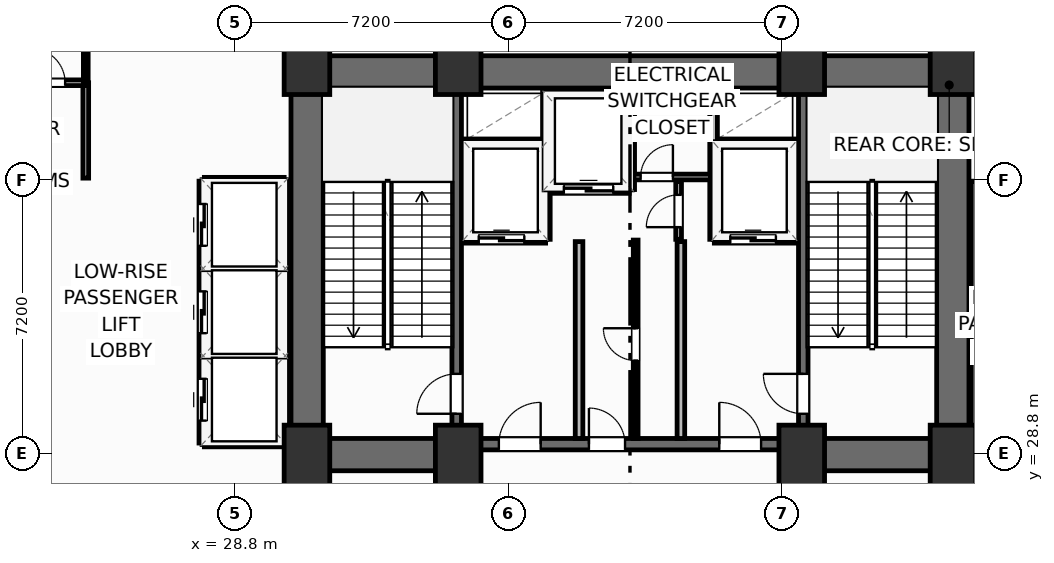
"""IFC4 building model, lengths in metres.
Left out: names, types, materials, properties, quantities, classifications, styles, units other than length and angle.
Written with IfcOpenShell. Run it as: python <this file> out.ifc"""

import sys

from ifc_helpers import new_model, si_unit, direction, frame, frame_2d, origin, origin_2d, place, context, subcontext, project, spatial, rectangle, extrude, element, fill, save


model = new_model("IFC4")
c1 = context("Model", 3, precision=1e-05, world=origin(), true_north=direction((0.0, 1.0)))
c2 = subcontext(c1, "Body", "Model", "MODEL_VIEW")
j1 = project(units=[si_unit("LENGTHUNIT", "METRE"), si_unit("PLANEANGLEUNIT", "RADIAN")], contexts=[c1])
p1 = place(None, origin())
s1 = spatial("IfcSite", under=j1, at=p1, CompositionType="ELEMENT")
p2 = place(p1, origin())
s2 = spatial("IfcBuilding", under=s1, at=p2, CompositionType="ELEMENT")
p3 = place(p2, frame((0.0, 0.0, 5.4)))
s3 = spatial("IfcBuildingStorey", under=s2, at=p3, CompositionType="ELEMENT", Elevation=5.4)
for number, where, z_axis, x_axis in (
    (1, (30.7, 28.75, 0.0), (0.0, 0.0, 1.0), (1.0, 0.0, 0.0)),
    (2, (34.68, 28.75, 0.0), (0.0, 0.0, 1.0), (1.0, 0.0, 0.0)),
    (3, (43.72, 28.75, 0.0), (0.0, 0.0, 1.0), (1.0, 0.0, 0.0)),
    (4, (47.7, 28.75, 0.0), (0.0, 0.0, 1.0), (1.0, 0.0, 0.0)),
    (5, (30.7, 39.05, 0.0), (0.0, 0.0, 1.0), (1.0, 0.0, 0.0)),
    (6, (34.68, 39.05, 0.0), (0.0, 0.0, 1.0), (1.0, 0.0, 0.0)),
    (7, (43.72, 39.05, 0.0), (0.0, 0.0, 1.0), (1.0, 0.0, 0.0)),
    (8, (47.7, 39.05, 0.0), (0.0, 0.0, 1.0), (1.0, 0.0, 0.0)),
):
    element("IfcColumn", number, at=place(p3, frame(where, z_axis=z_axis, x_axis=x_axis)), inside=s3, PredefinedType="COLUMN", context=c2, shape_type="SweptSolid", body=[
        extrude(rectangle(XDim=1.2, YDim=1.6, at=origin_2d()), origin(), (0.0, 0.0, 1.0), 5.4),
    ])
p4 = place(p3, frame((30.28, 38.845, 0.0), z_axis=(0.0, 0.0, 1.0), x_axis=(1.0, 0.0, 0.0)))
e9 = element("IfcWall", 9, at=p4, inside=s3, PredefinedType="SHEAR", context=c2, shape_type="SweptSolid", body=[
    extrude(rectangle(XDim=17.84, YDim=0.85, at=frame_2d((8.92, 0.0))), origin(), (0.0, 0.0, 1.0), 5.12),
])
for number, where, z_axis, x_axis in (
    (10, (30.705, 29.2, 0.0), (0.0, 0.0, 1.0), (0.0, 1.0, 0.0)),
    (11, (47.695, 29.2, 0.0), (0.0, 0.0, 1.0), (0.0, 1.0, 0.0)),
):
    element("IfcWall", number, at=place(p3, frame(where, z_axis=z_axis, x_axis=x_axis)), inside=s3, PredefinedType="SHEAR", context=c2, shape_type="SweptSolid", body=[
        extrude(rectangle(XDim=9.22, YDim=0.85, at=frame_2d((4.61, 0.0))), origin(), (0.0, 0.0, 1.0), 5.12),
    ])
for number, where, z_axis, x_axis in (
    (12, (30.28, 28.775, 0.0), (0.0, 0.0, 1.0), (1.0, 0.0, 0.0)),
    (13, (43.6, 28.775, 0.0), (0.0, 0.0, 1.0), (1.0, 0.0, 0.0)),
):
    element("IfcWall", number, at=place(p3, frame(where, z_axis=z_axis, x_axis=x_axis)), inside=s3, PredefinedType="SHEAR", context=c2, shape_type="SweptSolid", body=[
        extrude(rectangle(XDim=4.52, YDim=0.85, at=frame_2d((2.26, 0.0))), origin(), (0.0, 0.0, 1.0), 5.12),
    ])
p5 = place(p3, frame((34.8, 29.05, 0.0), z_axis=(0.0, 0.0, 1.0), x_axis=(1.0, 0.0, 0.0)))
e14 = element("IfcWall", 14, at=p5, inside=s3, PredefinedType="SHEAR", context=c2, shape_type="SweptSolid", body=[
    extrude(rectangle(XDim=8.8, YDim=0.3, at=frame_2d((4.4, 0.0))), origin(), (0.0, 0.0, 1.0), 5.12),
])
p6 = place(p5, frame((0.95, 0.0, 0.0)))
e15 = element("IfcOpeningElement", 15, at=p6, cuts=e14, PredefinedType="OPENING", context=c2, shape_type="SweptSolid", body=[
    extrude(rectangle(XDim=1.1, YDim=2.15, at=frame_2d((0.55, 1.075))), frame((0.0, 0.16, 0.0), z_axis=(0.0, -1.0, 0.0), x_axis=(1.0, 0.0, 0.0)), (0.0, 0.0, 1.0), 0.32),
])
p7 = place(p5, frame((6.75, 0.0, 0.0)))
e16 = element("IfcOpeningElement", 16, at=p7, cuts=e14, PredefinedType="OPENING", context=c2, shape_type="SweptSolid", body=[
    extrude(rectangle(XDim=1.1, YDim=2.15, at=frame_2d((0.55, 1.075))), frame((0.0, 0.16, 0.0), z_axis=(0.0, -1.0, 0.0), x_axis=(1.0, 0.0, 0.0)), (0.0, 0.0, 1.0), 0.32),
])
p8 = place(p5, frame((3.32, 0.0, 0.0)))
e17 = element("IfcOpeningElement", 17, at=p8, cuts=e14, PredefinedType="OPENING", context=c2, shape_type="SweptSolid", body=[
    extrude(rectangle(XDim=0.95, YDim=2.15, at=frame_2d((0.475, 1.075))), frame((0.0, 0.16, 0.0), z_axis=(0.0, -1.0, 0.0), x_axis=(1.0, 0.0, 0.0)), (0.0, 0.0, 1.0), 0.32),
])
p9 = place(p3, frame((34.64, 29.2, 0.0), z_axis=(0.0, 0.0, 1.0), x_axis=(0.0, 1.0, 0.0)))
e18 = element("IfcWall", 18, at=p9, inside=s3, PredefinedType="SHEAR", context=c2, shape_type="SweptSolid", body=[
    extrude(rectangle(XDim=9.22, YDim=0.25, at=frame_2d((4.61, 0.0))), origin(), (0.0, 0.0, 1.0), 5.12),
])
p10 = place(p9, frame((0.65, 0.0, 0.0)))
e19 = element("IfcOpeningElement", 19, at=p10, cuts=e18, PredefinedType="OPENING", context=c2, shape_type="SweptSolid", body=[
    extrude(rectangle(XDim=1.05, YDim=2.15, at=frame_2d((0.525, 1.075))), frame((0.0, 0.135, 0.0), z_axis=(0.0, -1.0, 0.0), x_axis=(1.0, 0.0, 0.0)), (0.0, 0.0, 1.0), 0.27),
])
p11 = place(p3, frame((43.76, 29.2, 0.0), z_axis=(0.0, 0.0, 1.0), x_axis=(0.0, 1.0, 0.0)))
e20 = element("IfcWall", 20, at=p11, inside=s3, PredefinedType="SHEAR", context=c2, shape_type="SweptSolid", body=[
    extrude(rectangle(XDim=9.22, YDim=0.25, at=frame_2d((4.61, 0.0))), origin(), (0.0, 0.0, 1.0), 5.12),
])
p12 = place(p11, frame((0.65, 0.0, 0.0)))
e21 = element("IfcOpeningElement", 21, at=p12, cuts=e20, PredefinedType="OPENING", context=c2, shape_type="SweptSolid", body=[
    extrude(rectangle(XDim=1.05, YDim=2.15, at=frame_2d((0.525, 1.075))), frame((0.0, 0.135, 0.0), z_axis=(0.0, -1.0, 0.0), x_axis=(1.0, 0.0, 0.0)), (0.0, 0.0, 1.0), 0.27),
])
p13 = place(p3, frame((24.88, 36.05, 0.0), z_axis=(0.0, 0.0, 1.0), x_axis=(0.0, 1.0, 0.0)))
e22 = element("IfcWall", 22, at=p13, inside=s3, PredefinedType="PARTITIONING", context=c2, shape_type="SweptSolid", body=[
    extrude(rectangle(XDim=2.51, YDim=0.15, at=frame_2d((1.255, 0.0))), origin(), (0.0, 0.0, 1.0), 5.12),
])
p14 = place(p3, frame((18.6, 38.56, 0.0), z_axis=(0.0, 0.0, 1.0), x_axis=(1.0, 0.0, 0.0)))
e23 = element("IfcWall", 23, at=p14, inside=s3, PredefinedType="PARTITIONING", context=c2, shape_type="SweptSolid", body=[
    extrude(rectangle(XDim=6.28, YDim=0.15, at=frame_2d((3.14, 0.0))), origin(), (0.0, 0.0, 1.0), 5.12),
])
p15 = place(p14, frame((0.614, 0.0, 0.0)))
e24 = element("IfcOpeningElement", 24, at=p15, cuts=e23, PredefinedType="OPENING", context=c2, shape_type="SweptSolid", body=[
    extrude(rectangle(XDim=0.9, YDim=2.05, at=frame_2d((0.45, 1.025))), frame((0.0, 0.085, 0.0), z_axis=(0.0, -1.0, 0.0), x_axis=(1.0, 0.0, 0.0)), (0.0, 0.0, 1.0), 0.17),
])
p16 = place(p14, frame((2.75, 0.0, 0.0)))
e25 = element("IfcOpeningElement", 25, at=p16, cuts=e23, PredefinedType="OPENING", context=c2, shape_type="SweptSolid", body=[
    extrude(rectangle(XDim=0.9, YDim=2.05, at=frame_2d((0.45, 1.025))), frame((0.0, 0.085, 0.0), z_axis=(0.0, -1.0, 0.0), x_axis=(1.0, 0.0, 0.0)), (0.0, 0.0, 1.0), 0.17),
])
p17 = place(p14, frame((4.836, 0.0, 0.0)))
e26 = element("IfcOpeningElement", 26, at=p17, cuts=e23, PredefinedType="OPENING", context=c2, shape_type="SweptSolid", body=[
    extrude(rectangle(XDim=0.9, YDim=2.05, at=frame_2d((0.45, 1.025))), frame((0.0, 0.085, 0.0), z_axis=(0.0, -1.0, 0.0), x_axis=(1.0, 0.0, 0.0)), (0.0, 0.0, 1.0), 0.17),
])
p18 = place(p3, frame((24.88, 38.56, 0.0), z_axis=(0.0, 0.0, 1.0), x_axis=(0.0, 1.0, 0.0)))
e27 = element("IfcWall", 27, at=p18, inside=s3, PredefinedType="PARTITIONING", context=c2, shape_type="SweptSolid", body=[
    extrude(rectangle(XDim=4.69, YDim=0.125, at=frame_2d((2.345, 0.0))), origin(), (0.0, 0.0, 1.0), 5.12),
])
for number, where, z_axis, x_axis in (
    (28, (37.86, 29.2, 0.0), (0.0, 0.0, 1.0), (0.0, 1.0, 0.0)),
    (29, (40.54, 29.2, 0.0), (0.0, 0.0, 1.0), (0.0, 1.0, 0.0)),
):
    element("IfcWall", number, at=place(p3, frame(where, z_axis=z_axis, x_axis=x_axis)), inside=s3, PredefinedType="PARTITIONING", context=c2, shape_type="SweptSolid", body=[
        extrude(rectangle(XDim=5.18, YDim=0.2, at=frame_2d((2.59, 0.0))), origin(), (0.0, 0.0, 1.0), 5.12),
    ])
p19 = place(p3, frame((34.8, 34.44, 0.0), z_axis=(0.0, 0.0, 1.0), x_axis=(1.0, 0.0, 0.0)))
e30 = element("IfcWall", 30, at=p19, inside=s3, PredefinedType="PARTITIONING", context=c2, shape_type="SweptSolid", body=[
    extrude(rectangle(XDim=2.18, YDim=0.2, at=frame_2d((1.09, 0.0))), origin(), (0.0, 0.0, 1.0), 5.12),
])
p20 = place(p19, frame((0.42, 0.0, 0.0)))
e31 = element("IfcOpeningElement", 31, at=p20, cuts=e30, PredefinedType="OPENING", context=c2, shape_type="SweptSolid", body=[
    extrude(rectangle(XDim=1.2, YDim=2.2, at=frame_2d((0.6, 1.1))), frame((0.0, 0.11, 0.0), z_axis=(0.0, -1.0, 0.0), x_axis=(1.0, 0.0, 0.0)), (0.0, 0.0, 1.0), 0.22),
])
p21 = place(p3, frame((34.8, 36.98, 0.0), z_axis=(0.0, 0.0, 1.0), x_axis=(1.0, 0.0, 0.0)))
e32 = element("IfcWall", 32, at=p21, inside=s3, PredefinedType="PARTITIONING", context=c2, shape_type="SweptSolid", body=[
    extrude(rectangle(XDim=2.18, YDim=0.2, at=frame_2d((1.09, 0.0))), origin(), (0.0, 0.0, 1.0), 5.12),
])
p22 = place(p3, frame((37.0, 34.44, 0.0), z_axis=(0.0, 0.0, 1.0), x_axis=(0.0, 1.0, 0.0)))
e33 = element("IfcWall", 33, at=p22, inside=s3, PredefinedType="PARTITIONING", context=c2, shape_type="SweptSolid", body=[
    extrude(rectangle(XDim=3.9, YDim=0.2, at=frame_2d((1.95, 0.0))), origin(), (0.0, 0.0, 1.0), 5.12),
])
p23 = place(p3, frame((41.42, 34.44, 0.0), z_axis=(0.0, 0.0, 1.0), x_axis=(1.0, 0.0, 0.0)))
e34 = element("IfcWall", 34, at=p23, inside=s3, PredefinedType="PARTITIONING", context=c2, shape_type="SweptSolid", body=[
    extrude(rectangle(XDim=2.18, YDim=0.2, at=frame_2d((1.09, 0.0))), origin(), (0.0, 0.0, 1.0), 5.12),
])
p24 = place(p23, frame((0.42, 0.0, 0.0)))
e35 = element("IfcOpeningElement", 35, at=p24, cuts=e34, PredefinedType="OPENING", context=c2, shape_type="SweptSolid", body=[
    extrude(rectangle(XDim=1.2, YDim=2.2, at=frame_2d((0.6, 1.1))), frame((0.0, 0.11, 0.0), z_axis=(0.0, -1.0, 0.0), x_axis=(1.0, 0.0, 0.0)), (0.0, 0.0, 1.0), 0.22),
])
p25 = place(p3, frame((41.42, 36.98, 0.0), z_axis=(0.0, 0.0, 1.0), x_axis=(1.0, 0.0, 0.0)))
e36 = element("IfcWall", 36, at=p25, inside=s3, PredefinedType="PARTITIONING", context=c2, shape_type="SweptSolid", body=[
    extrude(rectangle(XDim=2.18, YDim=0.2, at=frame_2d((1.09, 0.0))), origin(), (0.0, 0.0, 1.0), 5.12),
])
p26 = place(p3, frame((41.4, 34.44, 0.0), z_axis=(0.0, 0.0, 1.0), x_axis=(0.0, 1.0, 0.0)))
e37 = element("IfcWall", 37, at=p26, inside=s3, PredefinedType="PARTITIONING", context=c2, shape_type="SweptSolid", body=[
    extrude(rectangle(XDim=3.9, YDim=0.2, at=frame_2d((1.95, 0.0))), origin(), (0.0, 0.0, 1.0), 5.12),
])
p27 = place(p3, frame((37.06, 35.75, 0.0), z_axis=(0.0, 0.0, 1.0), x_axis=(1.0, 0.0, 0.0)))
e38 = element("IfcWall", 38, at=p27, inside=s3, PredefinedType="PARTITIONING", context=c2, shape_type="SweptSolid", body=[
    extrude(rectangle(XDim=2.12, YDim=0.2, at=frame_2d((1.06, 0.0))), origin(), (0.0, 0.0, 1.0), 5.12),
])
p28 = place(p27, frame((0.4, 0.0, 0.0)))
e39 = element("IfcOpeningElement", 39, at=p28, cuts=e38, PredefinedType="OPENING", context=c2, shape_type="SweptSolid", body=[
    extrude(rectangle(XDim=1.3, YDim=2.2, at=frame_2d((0.65, 1.1))), frame((0.0, 0.11, 0.0), z_axis=(0.0, -1.0, 0.0), x_axis=(1.0, 0.0, 0.0)), (0.0, 0.0, 1.0), 0.22),
])
p29 = place(p3, frame((39.22, 35.75, 0.0), z_axis=(0.0, 0.0, 1.0), x_axis=(0.0, 1.0, 0.0)))
e40 = element("IfcWall", 40, at=p29, inside=s3, PredefinedType="PARTITIONING", context=c2, shape_type="SweptSolid", body=[
    extrude(rectangle(XDim=2.59, YDim=0.2, at=frame_2d((1.295, 0.0))), origin(), (0.0, 0.0, 1.0), 5.12),
])
p30 = place(p3, frame((39.3, 36.08, 0.0), z_axis=(0.0, 0.0, 1.0), x_axis=(1.0, 0.0, 0.0)))
e41 = element("IfcWall", 41, at=p30, inside=s3, PredefinedType="PARTITIONING", context=c2, shape_type="SweptSolid", body=[
    extrude(rectangle(XDim=2.02, YDim=0.15, at=frame_2d((1.01, 0.0))), origin(), (0.0, 0.0, 1.0), 5.12),
])
p31 = place(p30, frame((0.18, 0.0, 0.0)))
e42 = element("IfcOpeningElement", 42, at=p31, cuts=e41, PredefinedType="OPENING", context=c2, shape_type="SweptSolid", body=[
    extrude(rectangle(XDim=0.85, YDim=2.05, at=frame_2d((0.425, 1.025))), frame((0.0, 0.085, 0.0), z_axis=(0.0, -1.0, 0.0), x_axis=(1.0, 0.0, 0.0)), (0.0, 0.0, 1.0), 0.17),
])
p32 = place(p3, frame((40.48, 34.44, 0.0), z_axis=(0.0, 0.0, 1.0), x_axis=(0.0, 1.0, 0.0)))
e43 = element("IfcWall", 43, at=p32, inside=s3, PredefinedType="PARTITIONING", context=c2, shape_type="SweptSolid", body=[
    extrude(rectangle(XDim=1.52, YDim=0.15, at=frame_2d((0.76, 0.0))), origin(), (0.0, 0.0, 1.0), 5.12),
])
p33 = place(p32, frame((0.32, 0.0, 0.0)))
e44 = element("IfcOpeningElement", 44, at=p33, cuts=e43, PredefinedType="OPENING", context=c2, shape_type="SweptSolid", body=[
    extrude(rectangle(XDim=0.85, YDim=2.05, at=frame_2d((0.425, 1.025))), frame((0.0, 0.085, 0.0), z_axis=(0.0, -1.0, 0.0), x_axis=(1.0, 0.0, 0.0)), (0.0, 0.0, 1.0), 0.17),
])
p34 = place(p3, frame((39.35, 29.2, 0.0), z_axis=(0.0, 0.0, 1.0), x_axis=(0.0, 1.0, 0.0)))
e45 = element("IfcWall", 45, at=p34, inside=s3, PredefinedType="PARTITIONING", context=c2, shape_type="SweptSolid", body=[
    extrude(rectangle(XDim=5.22, YDim=0.125, at=frame_2d((2.61, 0.0))), origin(), (0.0, 0.0, 1.0), 5.12),
])
p35 = place(p34, frame((2.05, 0.0, 0.0)))
e46 = element("IfcOpeningElement", 46, at=p35, cuts=e45, PredefinedType="OPENING", context=c2, shape_type="SweptSolid", body=[
    extrude(rectangle(XDim=0.85, YDim=2.05, at=frame_2d((0.425, 1.025))), frame((0.0, 0.073, 0.0), z_axis=(0.0, -1.0, 0.0), x_axis=(1.0, 0.0, 0.0)), (0.0, 0.0, 1.0), 0.145),
])
for number, where, z_axis, x_axis in (
    (47, (28.02, 31.375, 0.0), (0.0, 0.0, 1.0), (1.0, 0.0, 0.0)),
    (48, (28.02, 33.675, 0.0), (0.0, 0.0, 1.0), (1.0, 0.0, 0.0)),
):
    element("IfcWall", number, at=place(p3, frame(where, z_axis=z_axis, x_axis=x_axis)), inside=s3, PredefinedType="PARTITIONING", context=c2, shape_type="SweptSolid", body=[
        extrude(rectangle(XDim=2.06, YDim=0.2, at=frame_2d((1.03, 0.0))), origin(), (0.0, 0.0, 1.0), 5.12),
    ])
for number, where, z_axis, x_axis in (
    (49, (28.0, 29.08, 0.0), (0.0, 0.0, 1.0), (1.0, 0.0, 0.0)),
    (50, (28.0, 35.97, 0.0), (0.0, 0.0, 1.0), (1.0, 0.0, 0.0)),
):
    element("IfcWall", number, at=place(p3, frame(where, z_axis=z_axis, x_axis=x_axis)), inside=s3, PredefinedType="PARTITIONING", context=c2, shape_type="SweptSolid", body=[
        extrude(rectangle(XDim=2.1, YDim=0.2, at=frame_2d((1.05, 0.0))), origin(), (0.0, 0.0, 1.0), 5.12),
    ])
p36 = place(p3, frame((30.12, 29.08, 0.0), z_axis=(0.0, 0.0, 1.0), x_axis=(0.0, 1.0, 0.0)))
e51 = element("IfcWall", 51, at=p36, inside=s3, PredefinedType="PARTITIONING", context=c2, shape_type="SweptSolid", body=[
    extrude(rectangle(XDim=6.89, YDim=0.2, at=frame_2d((3.445, 0.0))), origin(), (0.0, 0.0, 1.0), 5.12),
])
p37 = place(p3, frame((27.96, 29.08, 0.0), z_axis=(0.0, 0.0, 1.0), x_axis=(0.0, 1.0, 0.0)))
e52 = element("IfcWall", 52, at=p37, inside=s3, PredefinedType="PARTITIONING", context=c2, shape_type="SweptSolid", body=[
    extrude(rectangle(XDim=6.89, YDim=0.2, at=frame_2d((3.445, 0.0))), origin(), (0.0, 0.0, 1.0), 5.12),
])
p38 = place(p37, frame((0.59, 0.0, 0.0)))
e53 = element("IfcOpeningElement", 53, at=p38, cuts=e52, PredefinedType="OPENING", context=c2, shape_type="SweptSolid", body=[
    extrude(rectangle(XDim=1.1, YDim=2.15, at=frame_2d((0.55, 1.075))), frame((0.0, 0.11, 0.0), z_axis=(0.0, -1.0, 0.0), x_axis=(1.0, 0.0, 0.0)), (0.0, 0.0, 1.0), 0.22),
])
p39 = place(p37, frame((2.89, 0.0, 0.0)))
e54 = element("IfcOpeningElement", 54, at=p39, cuts=e52, PredefinedType="OPENING", context=c2, shape_type="SweptSolid", body=[
    extrude(rectangle(XDim=1.1, YDim=2.15, at=frame_2d((0.55, 1.075))), frame((0.0, 0.11, 0.0), z_axis=(0.0, -1.0, 0.0), x_axis=(1.0, 0.0, 0.0)), (0.0, 0.0, 1.0), 0.22),
])
p40 = place(p37, frame((5.19, 0.0, 0.0)))
e55 = element("IfcOpeningElement", 55, at=p40, cuts=e52, PredefinedType="OPENING", context=c2, shape_type="SweptSolid", body=[
    extrude(rectangle(XDim=1.1, YDim=2.15, at=frame_2d((0.55, 1.075))), frame((0.0, 0.11, 0.0), z_axis=(0.0, -1.0, 0.0), x_axis=(1.0, 0.0, 0.0)), (0.0, 0.0, 1.0), 0.22),
])
p41 = place(p3, frame((48.28, 29.08, 0.0), z_axis=(0.0, 0.0, 1.0), x_axis=(0.0, 1.0, 0.0)))
e56 = element("IfcWall", 56, at=p41, inside=s3, PredefinedType="PARTITIONING", context=c2, shape_type="SweptSolid", body=[
    extrude(rectangle(XDim=6.89, YDim=0.2, at=frame_2d((3.445, 0.0))), origin(), (0.0, 0.0, 1.0), 5.12),
])
p42 = place(p17, origin())
e57 = element("IfcDoor", 57, at=p42, inside=s3, OperationType="SINGLE_SWING_LEFT", PredefinedType="DOOR", context=c2, shape_type="SweptSolid", body=[
    extrude(rectangle(XDim=0.9, YDim=2.05, at=frame_2d((0.45, 1.025))), frame((0.0, 0.025, 0.0), z_axis=(0.0, -1.0, 0.0), x_axis=(1.0, 0.0, 0.0)), (0.0, 0.0, 1.0), 0.05),
])
fill(e26, e57)
p43 = place(p10, origin())
e58 = element("IfcDoor", 58, at=p43, inside=s3, OperationType="SINGLE_SWING_LEFT", PredefinedType="DOOR", context=c2, shape_type="SweptSolid", body=[
    extrude(rectangle(XDim=1.05, YDim=2.15, at=frame_2d((0.525, 1.075))), frame((0.0, 0.025, 0.0), z_axis=(0.0, -1.0, 0.0), x_axis=(1.0, 0.0, 0.0)), (0.0, 0.0, 1.0), 0.05),
])
fill(e19, e58)
p44 = place(p12, origin())
e59 = element("IfcDoor", 59, at=p44, inside=s3, OperationType="SINGLE_SWING_RIGHT", PredefinedType="DOOR", context=c2, shape_type="SweptSolid", body=[
    extrude(rectangle(XDim=1.05, YDim=2.15, at=frame_2d((0.525, 1.075))), frame((0.0, 0.025, 0.0), z_axis=(0.0, -1.0, 0.0), x_axis=(1.0, 0.0, 0.0)), (0.0, 0.0, 1.0), 0.05),
])
fill(e21, e59)
p45 = place(p6, origin())
e60 = element("IfcDoor", 60, at=p45, inside=s3, OperationType="SINGLE_SWING_RIGHT", PredefinedType="DOOR", context=c2, shape_type="SweptSolid", body=[
    extrude(rectangle(XDim=1.1, YDim=2.15, at=frame_2d((0.55, 1.075))), frame((0.0, 0.025, 0.0), z_axis=(0.0, -1.0, 0.0), x_axis=(1.0, 0.0, 0.0)), (0.0, 0.0, 1.0), 0.05),
])
fill(e15, e60)
p46 = place(p7, origin())
e61 = element("IfcDoor", 61, at=p46, inside=s3, OperationType="SINGLE_SWING_LEFT", PredefinedType="DOOR", context=c2, shape_type="SweptSolid", body=[
    extrude(rectangle(XDim=1.1, YDim=2.15, at=frame_2d((0.55, 1.075))), frame((0.0, 0.025, 0.0), z_axis=(0.0, -1.0, 0.0), x_axis=(1.0, 0.0, 0.0)), (0.0, 0.0, 1.0), 0.05),
])
fill(e16, e61)
p47 = place(p20, origin())
e62 = element("IfcDoor", 62, at=p47, inside=s3, OperationType="SLIDING_TO_LEFT", PredefinedType="DOOR", context=c2, shape_type="SweptSolid", body=[
    extrude(rectangle(XDim=1.2, YDim=2.2, at=frame_2d((0.6, 1.1))), frame((0.0, 0.025, 0.0), z_axis=(0.0, -1.0, 0.0), x_axis=(1.0, 0.0, 0.0)), (0.0, 0.0, 1.0), 0.05),
])
fill(e31, e62)
p48 = place(p24, origin())
e63 = element("IfcDoor", 63, at=p48, inside=s3, OperationType="SLIDING_TO_LEFT", PredefinedType="DOOR", context=c2, shape_type="SweptSolid", body=[
    extrude(rectangle(XDim=1.2, YDim=2.2, at=frame_2d((0.6, 1.1))), frame((0.0, 0.025, 0.0), z_axis=(0.0, -1.0, 0.0), x_axis=(1.0, 0.0, 0.0)), (0.0, 0.0, 1.0), 0.05),
])
fill(e35, e63)
p49 = place(p28, origin())
e64 = element("IfcDoor", 64, at=p49, inside=s3, OperationType="SLIDING_TO_LEFT", PredefinedType="DOOR", context=c2, shape_type="SweptSolid", body=[
    extrude(rectangle(XDim=1.3, YDim=2.2, at=frame_2d((0.65, 1.1))), frame((0.0, 0.025, 0.0), z_axis=(0.0, -1.0, 0.0), x_axis=(1.0, 0.0, 0.0)), (0.0, 0.0, 1.0), 0.05),
])
fill(e39, e64)
p50 = place(p31, origin())
e65 = element("IfcDoor", 65, at=p50, inside=s3, OperationType="SINGLE_SWING_RIGHT", PredefinedType="DOOR", context=c2, shape_type="SweptSolid", body=[
    extrude(rectangle(XDim=0.85, YDim=2.05, at=frame_2d((0.425, 1.025))), frame((0.0, 0.025, 0.0), z_axis=(0.0, -1.0, 0.0), x_axis=(1.0, 0.0, 0.0)), (0.0, 0.0, 1.0), 0.05),
])
fill(e42, e65)
p51 = place(p33, origin())
e66 = element("IfcDoor", 66, at=p51, inside=s3, OperationType="SINGLE_SWING_LEFT", PredefinedType="DOOR", context=c2, shape_type="SweptSolid", body=[
    extrude(rectangle(XDim=0.85, YDim=2.05, at=frame_2d((0.425, 1.025))), frame((0.0, 0.025, 0.0), z_axis=(0.0, -1.0, 0.0), x_axis=(1.0, 0.0, 0.0)), (0.0, 0.0, 1.0), 0.05),
])
fill(e44, e66)
p52 = place(p35, origin())
e67 = element("IfcDoor", 67, at=p52, inside=s3, OperationType="SINGLE_SWING_RIGHT", PredefinedType="DOOR", context=c2, shape_type="SweptSolid", body=[
    extrude(rectangle(XDim=0.85, YDim=2.05, at=frame_2d((0.425, 1.025))), frame((0.0, 0.025, 0.0), z_axis=(0.0, -1.0, 0.0), x_axis=(1.0, 0.0, 0.0)), (0.0, 0.0, 1.0), 0.05),
])
fill(e46, e67)
p53 = place(p8, origin())
e68 = element("IfcDoor", 68, at=p53, inside=s3, OperationType="SINGLE_SWING_LEFT", PredefinedType="DOOR", context=c2, shape_type="SweptSolid", body=[
    extrude(rectangle(XDim=0.95, YDim=2.15, at=frame_2d((0.475, 1.075))), frame((0.0, 0.025, 0.0), z_axis=(0.0, -1.0, 0.0), x_axis=(1.0, 0.0, 0.0)), (0.0, 0.0, 1.0), 0.05),
])
fill(e17, e68)
p54 = place(p38, origin())
e69 = element("IfcDoor", 69, at=p54, inside=s3, OperationType="SLIDING_TO_LEFT", PredefinedType="DOOR", context=c2, shape_type="SweptSolid", body=[
    extrude(rectangle(XDim=1.1, YDim=2.15, at=frame_2d((0.55, 1.075))), frame((0.0, 0.025, 0.0), z_axis=(0.0, -1.0, 0.0), x_axis=(1.0, 0.0, 0.0)), (0.0, 0.0, 1.0), 0.05),
])
fill(e53, e69)
p55 = place(p39, origin())
e70 = element("IfcDoor", 70, at=p55, inside=s3, OperationType="SLIDING_TO_LEFT", PredefinedType="DOOR", context=c2, shape_type="SweptSolid", body=[
    extrude(rectangle(XDim=1.1, YDim=2.15, at=frame_2d((0.55, 1.075))), frame((0.0, 0.025, 0.0), z_axis=(0.0, -1.0, 0.0), x_axis=(1.0, 0.0, 0.0)), (0.0, 0.0, 1.0), 0.05),
])
fill(e54, e70)
p56 = place(p40, origin())
e71 = element("IfcDoor", 71, at=p56, inside=s3, OperationType="SLIDING_TO_LEFT", PredefinedType="DOOR", context=c2, shape_type="SweptSolid", body=[
    extrude(rectangle(XDim=1.1, YDim=2.15, at=frame_2d((0.55, 1.075))), frame((0.0, 0.025, 0.0), z_axis=(0.0, -1.0, 0.0), x_axis=(1.0, 0.0, 0.0)), (0.0, 0.0, 1.0), 0.05),
])
fill(e55, e71)
save(model, sys.argv[1])
